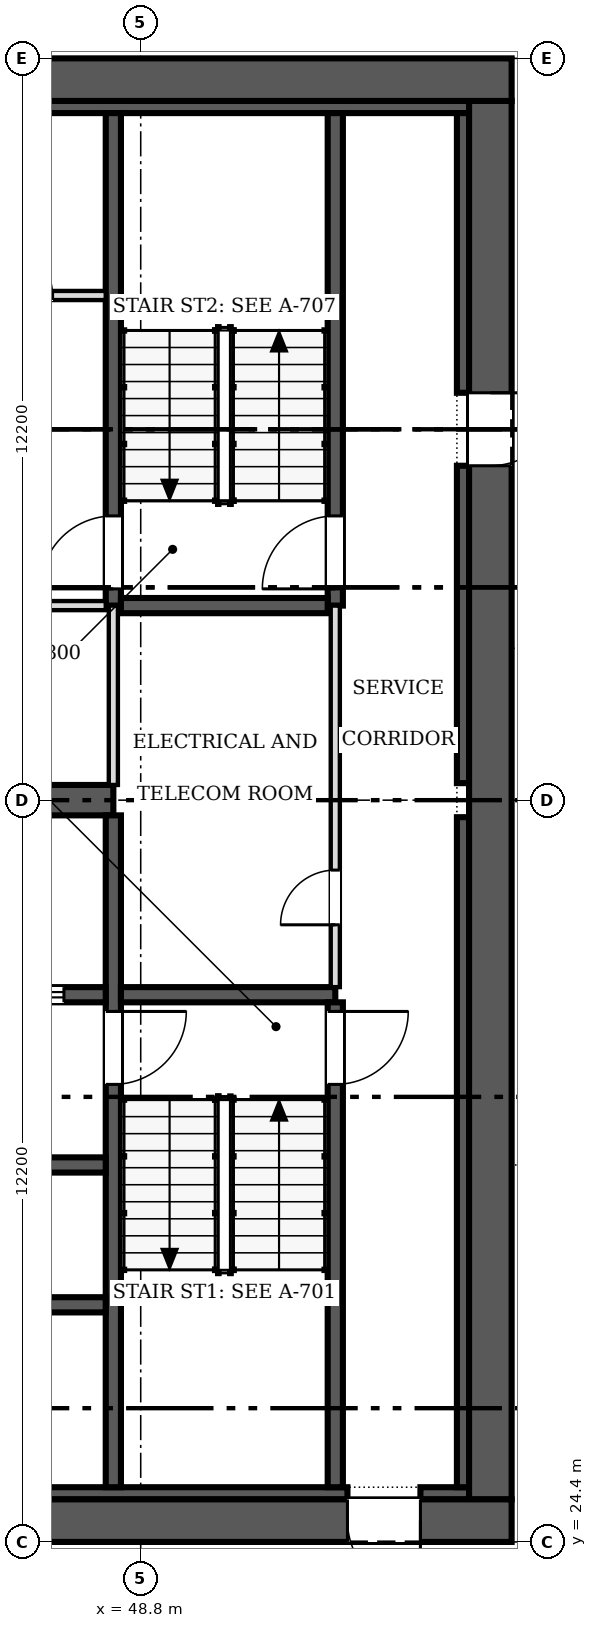
"""IFC4 building model, lengths in metres.
Left out: names, types, materials, properties, quantities, classifications, styles, units other than length and angle.
Written with IfcOpenShell. Run it as: python <this file> out.ifc"""

import sys

from ifc_helpers import new_model, si_unit, direction, frame, frame_2d, origin, place, context, subcontext, project, spatial, rectangle, extrude, source, transform, mapped, element, fill, save


model = new_model("IFC4")
c1 = context("Model", 3, precision=1e-05, world=origin(), true_north=direction((0.0, 1.0)))
c2 = subcontext(c1, "Body", "Model", "MODEL_VIEW")
j1 = project(units=[si_unit("LENGTHUNIT", "METRE"), si_unit("PLANEANGLEUNIT", "RADIAN")], contexts=[c1])
p1 = place(None, origin())
s1 = spatial("IfcSite", under=j1, at=p1, CompositionType="ELEMENT")
p2 = place(p1, origin())
s2 = spatial("IfcBuilding", under=s1, at=p2, CompositionType="ELEMENT")
p3 = place(p2, frame((0.0, 0.0, 146.8)))
s3 = spatial("IfcBuildingStorey", under=s2, at=p3, CompositionType="ELEMENT", Elevation=146.8)
p4 = place(p3, frame((54.9, 24.75, 0.0), z_axis=(0.0, 0.0, 1.0), x_axis=(-1.0, 0.0, 0.0)))
e1 = element("IfcWall", 1, at=p4, inside=s3, PredefinedType="SHEAR", context=c2, shape_type="SweptSolid", body=[
    extrude(rectangle(XDim=24.4, YDim=0.7, at=frame_2d((12.2, 0.0))), origin(), (0.0, 0.0, 1.0), 3.8),
])
m1 = source(origin(), c2, "Body", "SweptSolid", [
    extrude(rectangle(XDim=1.2, YDim=2.1, at=frame_2d((0.6, 1.05))), frame((0.0, 0.36, 0.0), z_axis=(0.0, -1.0, 0.0), x_axis=(1.0, 0.0, 0.0)), (0.0, 0.0, 1.0), 0.72),
])
p5 = place(p4, frame((1.5, 0.0, 0.0)))
e2 = element("IfcOpeningElement", 2, at=p5, cuts=e1, PredefinedType="OPENING", context=c2, shape_type="MappedRepresentation", body=[
    mapped(m1, transform((0.0, 0.0, 0.0), scale=1.0)),
])
p6 = place(p3, frame((30.5, 48.45, 0.0), z_axis=(0.0, 0.0, 1.0), x_axis=(1.0, 0.0, 0.0)))
e3 = element("IfcWall", 3, at=p6, inside=s3, PredefinedType="SHEAR", context=c2, shape_type="SweptSolid", body=[
    extrude(rectangle(XDim=24.4, YDim=0.7, at=frame_2d((12.2, 0.0))), origin(), (0.0, 0.0, 1.0), 3.8),
])
p7 = place(p3, frame((54.55, 48.1, 0.0), z_axis=(0.0, 0.0, 1.0), x_axis=(0.0, -1.0, 0.0)))
e4 = element("IfcWall", 4, at=p7, inside=s3, PredefinedType="SHEAR", context=c2, shape_type="SweptSolid", body=[
    extrude(rectangle(XDim=23.0, YDim=0.7, at=frame_2d((11.5, 0.0))), origin(), (0.0, 0.0, 1.0), 3.8),
])
p8 = place(p7, frame((4.8, 0.0, 0.0)))
e5 = element("IfcOpeningElement", 5, at=p8, cuts=e4, PredefinedType="OPENING", context=c2, shape_type="MappedRepresentation", body=[
    mapped(m1, transform((0.0, 0.0, 0.0), scale=1.0)),
])
p9 = place(p3, frame((31.2, 25.2, 0.0), z_axis=(0.0, 0.0, 1.0), x_axis=(1.0, 0.0, 0.0)))
e6 = element("IfcWall", 6, at=p9, inside=s3, PredefinedType="SOLIDWALL", context=c2, shape_type="SweptSolid", body=[
    extrude(rectangle(XDim=21.0, YDim=0.2, at=frame_2d((10.5, 0.0))), origin(), (0.0, 0.0, 1.0), 3.8),
])
p10 = place(p3, frame((53.4, 25.2, 0.0), z_axis=(0.0, 0.0, 1.0), x_axis=(1.0, 0.0, 0.0)))
e7 = element("IfcWall", 7, at=p10, inside=s3, PredefinedType="SOLIDWALL", context=c2, shape_type="SweptSolid", body=[
    extrude(rectangle(XDim=0.8, YDim=0.2, at=frame_2d((0.4, 0.0))), origin(), (0.0, 0.0, 1.0), 3.8),
])
p11 = place(p3, frame((31.2, 48.0, 0.0), z_axis=(0.0, 0.0, 1.0), x_axis=(1.0, 0.0, 0.0)))
e8 = element("IfcWall", 8, at=p11, inside=s3, PredefinedType="SOLIDWALL", context=c2, shape_type="SweptSolid", body=[
    extrude(rectangle(XDim=23.0, YDim=0.2, at=frame_2d((11.5, 0.0))), origin(), (0.0, 0.0, 1.0), 3.8),
])
p12 = place(p3, frame((54.1, 25.3, 0.0), z_axis=(0.0, 0.0, 1.0), x_axis=(0.0, 1.0, 0.0)))
e9 = element("IfcWall", 9, at=p12, inside=s3, PredefinedType="SOLIDWALL", context=c2, shape_type="SweptSolid", body=[
    extrude(rectangle(XDim=11.02, YDim=0.2, at=frame_2d((5.51, 0.0))), origin(), (0.0, 0.0, 1.0), 3.8),
])
p13 = place(p3, frame((54.1, 36.88, 0.0), z_axis=(0.0, 0.0, 1.0), x_axis=(0.0, 1.0, 0.0)))
e10 = element("IfcWall", 10, at=p13, inside=s3, PredefinedType="SOLIDWALL", context=c2, shape_type="SweptSolid", body=[
    extrude(rectangle(XDim=5.22, YDim=0.2, at=frame_2d((2.61, 0.0))), origin(), (0.0, 0.0, 1.0), 3.8),
])
p14 = place(p3, frame((54.1, 43.3, 0.0), z_axis=(0.0, 0.0, 1.0), x_axis=(0.0, 1.0, 0.0)))
e11 = element("IfcWall", 11, at=p14, inside=s3, PredefinedType="SOLIDWALL", context=c2, shape_type="SweptSolid", body=[
    extrude(rectangle(XDim=4.6, YDim=0.2, at=frame_2d((2.3, 0.0))), origin(), (0.0, 0.0, 1.0), 3.8),
])
p15 = place(p3, frame((31.4, 36.6, 0.0), z_axis=(0.0, 0.0, 1.0), x_axis=(1.0, 0.0, 0.0)))
e12 = element("IfcWall", 12, at=p15, inside=s3, PredefinedType="SHEAR", context=c2, shape_type="SweptSolid", body=[
    extrude(rectangle(XDim=16.95, YDim=0.5, at=frame_2d((8.475, 0.0))), origin(), (0.0, 0.0, 1.0), 3.8),
])
p16 = place(p3, frame((48.35, 36.35, 0.0), z_axis=(0.0, 0.0, 1.0), x_axis=(0.0, -1.0, 0.0)))
e13 = element("IfcWall", 13, at=p16, inside=s3, PredefinedType="SOLIDWALL", context=c2, shape_type="SweptSolid", body=[
    extrude(rectangle(XDim=11.05, YDim=0.25, at=frame_2d((5.525, 0.0))), origin(), (0.0, 0.0, 1.0), 3.8),
])
m2 = source(origin(), c2, "Body", "SweptSolid", [
    extrude(rectangle(XDim=1.2, YDim=2.1, at=frame_2d((0.6, 1.05))), frame((0.0, 0.135, 0.0), z_axis=(0.0, -1.0, 0.0), x_axis=(1.0, 0.0, 0.0)), (0.0, 0.0, 1.0), 0.27),
])
p17 = place(p16, frame((3.225, 0.0, 0.0)))
e14 = element("IfcOpeningElement", 14, at=p17, cuts=e13, PredefinedType="OPENING", context=c2, shape_type="MappedRepresentation", body=[
    mapped(m2, transform((0.0, 0.0, 0.0), scale=1.0)),
])
p18 = place(p3, frame((48.225, 33.4, 0.0), z_axis=(0.0, 0.0, 1.0), x_axis=(-1.0, 0.0, 0.0)))
e15 = element("IfcWall", 15, at=p18, inside=s3, PredefinedType="SOLIDWALL", context=c2, shape_type="SweptSolid", body=[
    extrude(rectangle(XDim=5.275, YDim=0.25, at=frame_2d((2.638, 0.0))), origin(), (0.0, 0.0, 1.0), 3.8),
])
p19 = place(p18, frame((3.512, 0.0, 0.0)))
e16 = element("IfcOpeningElement", 16, at=p19, cuts=e15, PredefinedType="OPENING", context=c2, shape_type="MappedRepresentation", body=[
    mapped(m2, transform((0.0, 0.0, 0.0), scale=1.0)),
])
p20 = place(p18, frame((0.688, 0.0, 0.0)))
e17 = element("IfcOpeningElement", 17, at=p20, cuts=e15, PredefinedType="OPENING", context=c2, shape_type="MappedRepresentation", body=[
    mapped(m2, transform((0.0, 0.0, 0.0), scale=1.0)),
])
p21 = place(p3, frame((48.475, 33.4, 0.0), z_axis=(0.0, 0.0, 1.0), x_axis=(1.0, 0.0, 0.0)))
e18 = element("IfcWall", 18, at=p21, inside=s3, PredefinedType="SOLIDWALL", context=c2, shape_type="SweptSolid", body=[
    extrude(rectangle(XDim=3.525, YDim=0.25, at=frame_2d((1.762, 0.0))), origin(), (0.0, 0.0, 1.0), 3.8),
])
p22 = place(p3, frame((48.35, 47.9, 0.0), z_axis=(0.0, 0.0, 1.0), x_axis=(0.0, -1.0, 0.0)))
e19 = element("IfcWall", 19, at=p22, inside=s3, PredefinedType="SOLIDWALL", context=c2, shape_type="SweptSolid", body=[
    extrude(rectangle(XDim=8.1, YDim=0.25, at=frame_2d((4.05, 0.0))), origin(), (0.0, 0.0, 1.0), 3.8),
])
p23 = place(p22, frame((6.625, 0.0, 0.0)))
e20 = element("IfcOpeningElement", 20, at=p23, cuts=e19, PredefinedType="OPENING", context=c2, shape_type="MappedRepresentation", body=[
    mapped(m2, transform((0.0, 0.0, 0.0), scale=1.0)),
])
p24 = place(p3, frame((52.0, 25.3, 0.0), z_axis=(0.0, 0.0, 1.0), x_axis=(0.0, 1.0, 0.0)))
e21 = element("IfcWall", 21, at=p24, inside=s3, PredefinedType="SOLIDWALL", context=c2, shape_type="SweptSolid", body=[
    extrude(rectangle(XDim=7.975, YDim=0.25, at=frame_2d((3.987, 0.0))), origin(), (0.0, 0.0, 1.0), 3.8),
])
p25 = place(p24, frame((6.625, 0.0, 0.0)))
e22 = element("IfcOpeningElement", 22, at=p25, cuts=e21, PredefinedType="OPENING", context=c2, shape_type="MappedRepresentation", body=[
    mapped(m2, transform((0.0, 0.0, 0.0), scale=1.0)),
])
p26 = place(p3, frame((52.0, 39.8, 0.0), z_axis=(0.0, 0.0, 1.0), x_axis=(0.0, 1.0, 0.0)))
e23 = element("IfcWall", 23, at=p26, inside=s3, PredefinedType="SOLIDWALL", context=c2, shape_type="SweptSolid", body=[
    extrude(rectangle(XDim=8.1, YDim=0.25, at=frame_2d((4.05, 0.0))), origin(), (0.0, 0.0, 1.0), 3.8),
])
p27 = place(p26, frame((0.275, 0.0, 0.0)))
e24 = element("IfcOpeningElement", 24, at=p27, cuts=e23, PredefinedType="OPENING", context=c2, shape_type="MappedRepresentation", body=[
    mapped(m2, transform((0.0, 0.0, 0.0), scale=1.0)),
])
for number, where, z_axis, x_axis in (
    (25, (42.95, 28.3, 0.0), (0.0, 0.0, 1.0), (1.0, 0.0, 0.0)),
    (26, (42.95, 30.6, 0.0), (0.0, 0.0, 1.0), (1.0, 0.0, 0.0)),
):
    element("IfcWall", number, at=place(p3, frame(where, z_axis=z_axis, x_axis=x_axis)), inside=s3, PredefinedType="SOLIDWALL", context=c2, shape_type="SweptSolid", body=[
        extrude(rectangle(XDim=5.275, YDim=0.25, at=frame_2d((2.638, 0.0))), origin(), (0.0, 0.0, 1.0), 3.8),
    ])
p28 = place(p3, frame((48.475, 39.8, 0.0), z_axis=(0.0, 0.0, 1.0), x_axis=(1.0, 0.0, 0.0)))
e27 = element("IfcWall", 27, at=p28, inside=s3, PredefinedType="SOLIDWALL", context=c2, shape_type="SweptSolid", body=[
    extrude(rectangle(XDim=3.4, YDim=0.25, at=frame_2d((1.7, 0.0))), origin(), (0.0, 0.0, 1.0), 3.8),
])
p29 = place(p3, frame((52.0, 33.525, 0.0), z_axis=(0.0, 0.0, 1.0), x_axis=(0.0, 1.0, 0.0)))
e28 = element("IfcWall", 28, at=p29, inside=s3, PredefinedType="PARTITIONING", context=c2, shape_type="SweptSolid", body=[
    extrude(rectangle(XDim=6.275, YDim=0.15, at=frame_2d((3.138, 0.0))), origin(), (0.0, 0.0, 1.0), 3.5),
])
m3 = source(origin(), c2, "Body", "SweptSolid", [
    extrude(rectangle(XDim=0.9, YDim=2.1, at=frame_2d((0.45, 1.05))), frame((0.0, 0.085, 0.0), z_axis=(0.0, -1.0, 0.0), x_axis=(1.0, 0.0, 0.0)), (0.0, 0.0, 1.0), 0.17),
])
p30 = place(p29, frame((1.025, 0.0, 0.0)))
e29 = element("IfcOpeningElement", 29, at=p30, cuts=e28, PredefinedType="OPENING", context=c2, shape_type="MappedRepresentation", body=[
    mapped(m3, transform((0.0, 0.0, 0.0), scale=1.0)),
])
p31 = place(p3, frame((48.225, 39.8, 0.0), z_axis=(0.0, 0.0, 1.0), x_axis=(-1.0, 0.0, 0.0)))
e30 = element("IfcWall", 30, at=p31, inside=s3, PredefinedType="PARTITIONING", context=c2, shape_type="SweptSolid", body=[
    extrude(rectangle(XDim=5.275, YDim=0.15, at=frame_2d((2.638, 0.0))), origin(), (0.0, 0.0, 1.0), 3.5),
])
p32 = place(p31, frame((2.25, 0.0, 0.0)))
e31 = element("IfcOpeningElement", 31, at=p32, cuts=e30, PredefinedType="OPENING", context=c2, shape_type="MappedRepresentation", body=[
    mapped(m3, transform((0.0, 0.0, 0.0), scale=1.0)),
])
p33 = place(p3, frame((48.35, 36.85, 0.0), z_axis=(0.0, 0.0, 1.0), x_axis=(0.0, 1.0, 0.0)))
e32 = element("IfcWall", 32, at=p33, inside=s3, PredefinedType="PARTITIONING", context=c2, shape_type="SweptSolid", body=[
    extrude(rectangle(XDim=2.95, YDim=0.15, at=frame_2d((1.475, 0.0))), origin(), (0.0, 0.0, 1.0), 3.5),
])
p34 = place(p3, frame((45.6, 44.9, 0.0), z_axis=(0.0, 0.0, 1.0), x_axis=(1.0, 0.0, 0.0)))
e33 = element("IfcWall", 33, at=p34, inside=s3, PredefinedType="PARTITIONING", context=c2, shape_type="SweptSolid", body=[
    extrude(rectangle(XDim=2.625, YDim=0.15, at=frame_2d((1.312, 0.0))), origin(), (0.0, 0.0, 1.0), 3.5),
])
p35 = place(p34, frame((0.85, 0.0, 0.0)))
e34 = element("IfcOpeningElement", 34, at=p35, cuts=e33, PredefinedType="OPENING", context=c2, shape_type="MappedRepresentation", body=[
    mapped(m3, transform((0.0, 0.0, 0.0), scale=1.0)),
])
m4 = source(origin(), c2, "Body", "SweptSolid", [
    extrude(rectangle(XDim=1.2, YDim=2.1, at=frame_2d((0.6, 1.05))), frame((0.0, 0.025, 0.0), z_axis=(0.0, -1.0, 0.0), x_axis=(1.0, 0.0, 0.0)), (0.0, 0.0, 1.0), 0.05),
])
p36 = place(p5, origin())
e35 = element("IfcDoor", 35, at=p36, inside=s3, OperationType="SINGLE_SWING_LEFT", PredefinedType="DOOR", context=c2, shape_type="MappedRepresentation", body=[
    mapped(m4, transform((0.0, 0.0, 0.0), scale=1.0)),
])
fill(e2, e35)
p37 = place(p8, origin())
e36 = element("IfcDoor", 36, at=p37, inside=s3, OperationType="SINGLE_SWING_LEFT", PredefinedType="DOOR", context=c2, shape_type="MappedRepresentation", body=[
    mapped(m4, transform((0.0, 0.0, 0.0), scale=1.0)),
])
fill(e5, e36)
p38 = place(p17, origin())
e37 = element("IfcDoor", 37, at=p38, inside=s3, OperationType="SINGLE_SWING_LEFT", PredefinedType="DOOR", context=c2, shape_type="MappedRepresentation", body=[
    mapped(m4, transform((0.0, 0.0, 0.0), scale=1.0)),
])
fill(e14, e37)
p39 = place(p20, origin())
e38 = element("IfcDoor", 38, at=p39, inside=s3, OperationType="DOUBLE_DOOR_SLIDING", PredefinedType="DOOR", context=c2, shape_type="MappedRepresentation", body=[
    mapped(m4, transform((0.0, 0.0, 0.0), scale=1.0)),
])
fill(e17, e38)
p40 = place(p23, origin())
e39 = element("IfcDoor", 39, at=p40, inside=s3, OperationType="SINGLE_SWING_RIGHT", PredefinedType="DOOR", context=c2, shape_type="MappedRepresentation", body=[
    mapped(m4, transform((0.0, 0.0, 0.0), scale=1.0)),
])
fill(e20, e39)
p41 = place(p25, origin())
e40 = element("IfcDoor", 40, at=p41, inside=s3, OperationType="SINGLE_SWING_RIGHT", PredefinedType="DOOR", context=c2, shape_type="MappedRepresentation", body=[
    mapped(m4, transform((0.0, 0.0, 0.0), scale=1.0)),
])
fill(e22, e40)
p42 = place(p27, origin())
e41 = element("IfcDoor", 41, at=p42, inside=s3, OperationType="SINGLE_SWING_LEFT", PredefinedType="DOOR", context=c2, shape_type="MappedRepresentation", body=[
    mapped(m4, transform((0.0, 0.0, 0.0), scale=1.0)),
])
fill(e24, e41)
m5 = source(origin(), c2, "Body", "SweptSolid", [
    extrude(rectangle(XDim=0.9, YDim=2.1, at=frame_2d((0.45, 1.05))), frame((0.0, 0.025, 0.0), z_axis=(0.0, -1.0, 0.0), x_axis=(1.0, 0.0, 0.0)), (0.0, 0.0, 1.0), 0.05),
])
p43 = place(p30, origin())
e42 = element("IfcDoor", 42, at=p43, inside=s3, OperationType="SINGLE_SWING_LEFT", PredefinedType="DOOR", context=c2, shape_type="MappedRepresentation", body=[
    mapped(m5, transform((0.0, 0.0, 0.0), scale=1.0)),
])
fill(e29, e42)
save(model, sys.argv[1])
